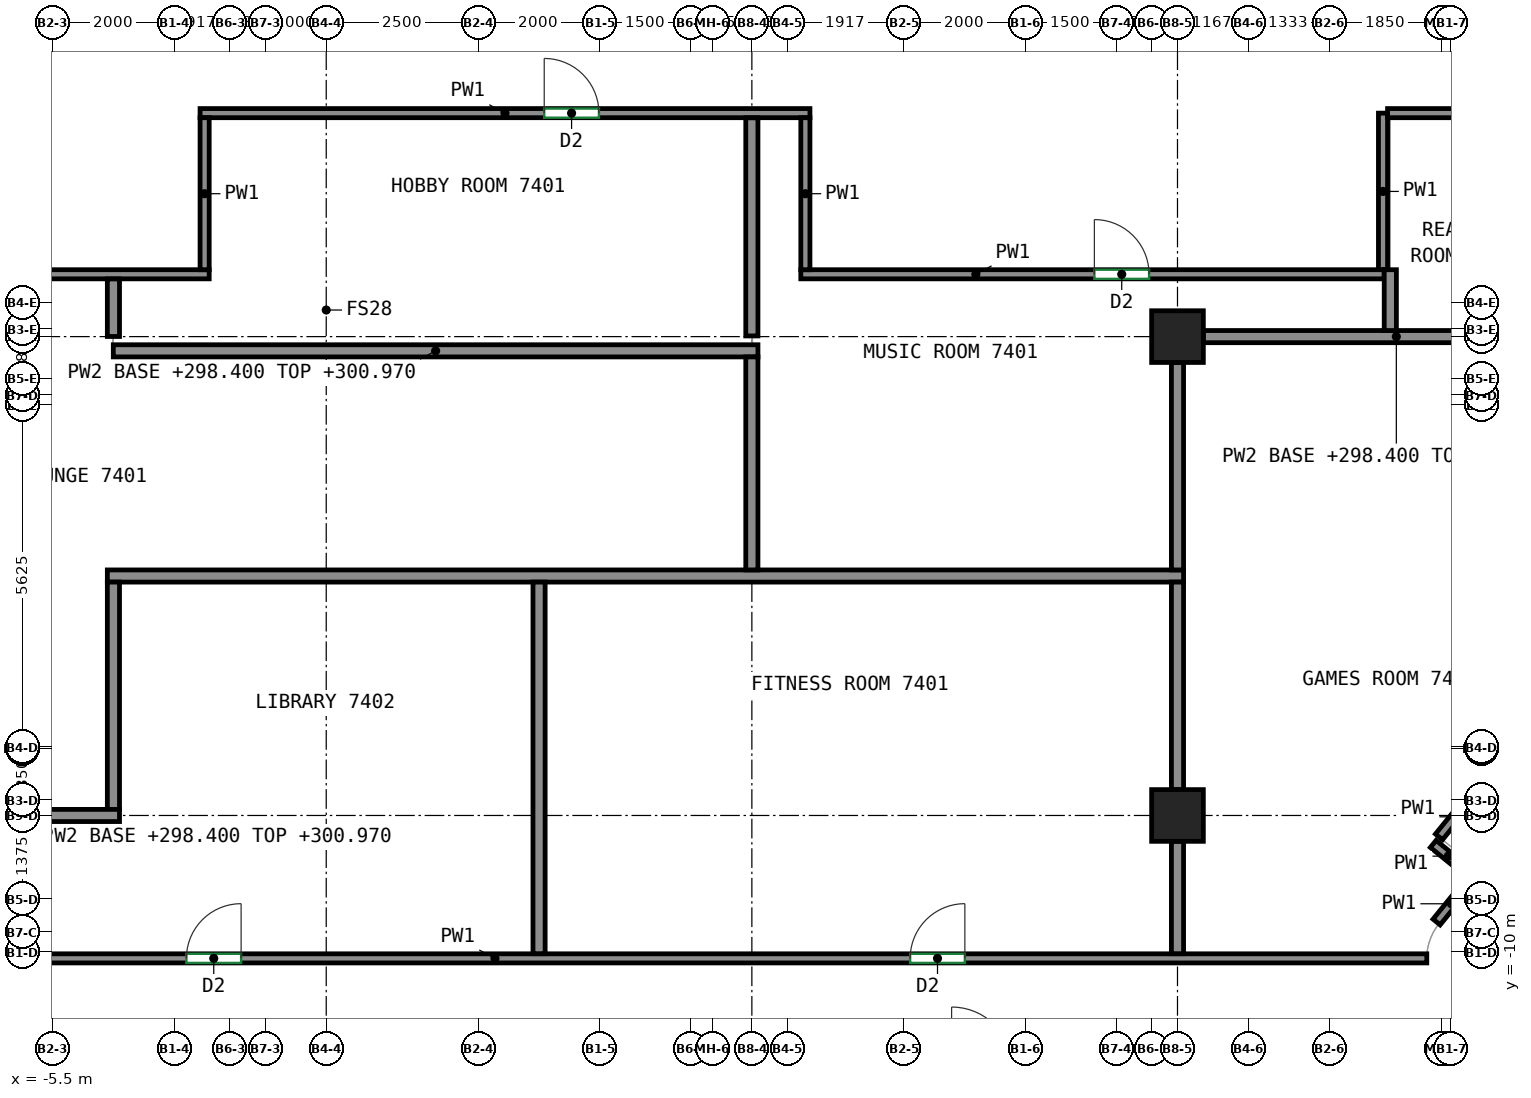
"""IFC4 building model, lengths in metres.
Left out: names, types, materials, properties, quantities, classifications, styles, units other than length and angle.
Written with IfcOpenShell. Run it as: python <this file> out.ifc"""

import sys

from ifc_helpers import new_model, si_unit, direction, frame, frame_2d, origin, origin_2d, place, context, subcontext, project, spatial, rectangle, extrude, source, transform, mapped, element, fill, save


model = new_model("IFC4")
c1 = context("Model", 3, precision=1e-05, world=origin(), true_north=direction((0.0, 1.0)))
c2 = subcontext(c1, "Body", "Model", "MODEL_VIEW")
j1 = project(units=[si_unit("LENGTHUNIT", "METRE"), si_unit("PLANEANGLEUNIT", "RADIAN")], contexts=[c1])
p1 = place(None, origin())
s1 = spatial("IfcSite", under=j1, at=p1, CompositionType="ELEMENT")
p2 = place(p1, origin())
s2 = spatial("IfcBuilding", under=s1, at=p2, CompositionType="ELEMENT")
p3 = place(p2, frame((0.0, 0.0, 298.4)))
s3 = spatial("IfcBuildingStorey", under=s2, at=p3, CompositionType="ELEMENT", Elevation=298.4)
m1 = source(origin(), c2, "Body", "SweptSolid", [
    extrude(rectangle(XDim=0.85, YDim=0.85, at=origin_2d()), origin(), (0.0, 0.0, 1.0), 3.12),
])
for number, where, z_axis, x_axis in (
    (1, (13.0, -7.75, 0.0), (0.0, 0.0, 1.0), (1.0, 0.0, 0.0)),
    (2, (13.0, 0.125, 0.0), (0.0, 0.0, 1.0), (1.0, 0.0, 0.0)),
):
    element("IfcColumn", number, at=place(p3, frame(where, z_axis=z_axis, x_axis=x_axis)), inside=s3, PredefinedType="COLUMN", context=c2, shape_type="MappedRepresentation", body=[
        mapped(m1, transform((0.0, 0.0, 0.0))),
    ])
p4 = place(p3, frame((-14.935, 1.15, 0.0), z_axis=(0.0, 0.0, 1.0), x_axis=(1.0, 0.0, 0.0)))
e3 = element("IfcWall", 3, at=p4, inside=s3, PredefinedType="PARTITIONING", context=c2, shape_type="SweptSolid", body=[
    extrude(rectangle(XDim=12.01, YDim=0.15, at=frame_2d((6.005, 0.0))), origin(), (0.0, 0.0, 1.0), 3.12),
])
p5 = place(p4, frame((3.418, 0.0, 0.0)))
e4 = element("IfcOpeningElement", 4, at=p5, cuts=e3, PredefinedType="OPENING", context=c2, shape_type="SweptSolid", body=[
    extrude(rectangle(XDim=1.8, YDim=2.1, at=frame_2d((0.9, 1.05))), frame((0.0, 0.085, 0.0), z_axis=(0.0, -1.0, 0.0), x_axis=(1.0, 0.0, 0.0)), (0.0, 0.0, 1.0), 0.17),
])
p6 = place(p3, frame((-13.55, -10.1, 0.0), z_axis=(0.0, 0.0, 1.0), x_axis=(1.0, 0.0, 0.0)))
e5 = element("IfcWall", 5, at=p6, inside=s3, PredefinedType="PARTITIONING", context=c2, shape_type="SweptSolid", body=[
    extrude(rectangle(XDim=30.65, YDim=0.15, at=frame_2d((15.325, 0.0))), origin(), (0.0, 0.0, 1.0), 3.12),
])
p7 = place(p6, frame((10.25, 0.0, 0.0)))
e6 = element("IfcOpeningElement", 6, at=p7, cuts=e5, PredefinedType="OPENING", context=c2, shape_type="SweptSolid", body=[
    extrude(rectangle(XDim=0.9, YDim=2.1, at=frame_2d((0.45, 1.05))), frame((0.0, 0.085, 0.0), z_axis=(0.0, -1.0, 0.0), x_axis=(1.0, 0.0, 0.0)), (0.0, 0.0, 1.0), 0.17),
])
p8 = place(p6, frame((22.153, 0.0, 0.0)))
e7 = element("IfcOpeningElement", 7, at=p8, cuts=e5, PredefinedType="OPENING", context=c2, shape_type="SweptSolid", body=[
    extrude(rectangle(XDim=0.9, YDim=2.1, at=frame_2d((0.45, 1.05))), frame((0.0, 0.085, 0.0), z_axis=(0.0, -1.0, 0.0), x_axis=(1.0, 0.0, 0.0)), (0.0, 0.0, 1.0), 0.17),
])
p9 = place(p3, frame((-3.075, 3.8, 0.0), z_axis=(0.0, 0.0, 1.0), x_axis=(1.0, 0.0, 0.0)))
e8 = element("IfcWall", 8, at=p9, inside=s3, PredefinedType="PARTITIONING", context=c2, shape_type="SweptSolid", body=[
    extrude(rectangle(XDim=10.03, YDim=0.15, at=frame_2d((5.015, 0.0))), origin(), (0.0, 0.0, 1.0), 3.12),
])
p10 = place(p9, frame((5.66, 0.0, 0.0)))
e9 = element("IfcOpeningElement", 9, at=p10, cuts=e8, PredefinedType="OPENING", context=c2, shape_type="SweptSolid", body=[
    extrude(rectangle(XDim=0.9, YDim=2.1, at=frame_2d((0.45, 1.05))), frame((0.0, 0.085, 0.0), z_axis=(0.0, -1.0, 0.0), x_axis=(1.0, 0.0, 0.0)), (0.0, 0.0, 1.0), 0.17),
])
p11 = place(p3, frame((-3.0, 1.225, 0.0), z_axis=(0.0, 0.0, 1.0), x_axis=(0.0, 1.0, 0.0)))
e10 = element("IfcWall", 10, at=p11, inside=s3, PredefinedType="PARTITIONING", context=c2, shape_type="SweptSolid", body=[
    extrude(rectangle(XDim=2.5, YDim=0.15, at=frame_2d((1.25, 0.0))), origin(), (0.0, 0.0, 1.0), 3.12),
])
p12 = place(p3, frame((16.38, 1.225, 0.0), z_axis=(0.0, 0.0, 1.0), x_axis=(0.0, 1.0, 0.0)))
e11 = element("IfcWall", 11, at=p12, inside=s3, PredefinedType="PARTITIONING", context=c2, shape_type="SweptSolid", body=[
    extrude(rectangle(XDim=2.575, YDim=0.15, at=frame_2d((1.288, 0.0))), origin(), (0.0, 0.0, 1.0), 3.12),
])
p13 = place(p3, frame((6.805, 1.15, 0.0), z_axis=(0.0, 0.0, 1.0), x_axis=(1.0, 0.0, 0.0)))
e12 = element("IfcWall", 12, at=p13, inside=s3, PredefinedType="PARTITIONING", context=c2, shape_type="SweptSolid", body=[
    extrude(rectangle(XDim=9.595, YDim=0.15, at=frame_2d((4.797, 0.0))), origin(), (0.0, 0.0, 1.0), 3.12),
])
p14 = place(p13, frame((4.828, 0.0, 0.0)))
e13 = element("IfcOpeningElement", 13, at=p14, cuts=e12, PredefinedType="OPENING", context=c2, shape_type="SweptSolid", body=[
    extrude(rectangle(XDim=0.9, YDim=2.1, at=frame_2d((0.45, 1.05))), frame((0.0, 0.085, 0.0), z_axis=(0.0, -1.0, 0.0), x_axis=(1.0, 0.0, 0.0)), (0.0, 0.0, 1.0), 0.17),
])
p15 = place(p3, frame((6.88, 3.725, 0.0), z_axis=(0.0, 0.0, 1.0), x_axis=(0.0, -1.0, 0.0)))
e14 = element("IfcWall", 14, at=p15, inside=s3, PredefinedType="PARTITIONING", context=c2, shape_type="SweptSolid", body=[
    extrude(rectangle(XDim=2.5, YDim=0.15, at=frame_2d((1.25, 0.0))), origin(), (0.0, 0.0, 1.0), 3.12),
])
p16 = place(p3, frame((17.748, -8.902, 0.0), z_axis=(0.0, 0.0, 1.0), x_axis=(-0.630342797145, -0.776316918589, 0.0)))
e15 = element("IfcWall", 15, at=p16, inside=s3, PredefinedType="PARTITIONING", context=c2, shape_type="SweptSolid", body=[
    extrude(rectangle(XDim=0.773, YDim=0.15, at=frame_2d((0.386, 0.0))), origin(), (0.0, 0.0, 1.0), 3.12),
])
p17 = place(p3, frame((17.206, -8.218, 0.0), z_axis=(0.0, 0.0, 1.0), x_axis=(0.776102288291, -0.630607039376, 0.0)))
e16 = element("IfcWall", 16, at=p17, inside=s3, PredefinedType="PARTITIONING", context=c2, shape_type="SweptSolid", body=[
    extrude(rectangle(XDim=0.638, YDim=0.15, at=frame_2d((0.319, 0.0))), origin(), (0.0, 0.0, 1.0), 3.12),
])
p18 = place(p3, frame((17.835, -7.442, 0.0), z_axis=(0.0, 0.0, 1.0), x_axis=(-0.628859024249, -0.777519342281, 0.0)))
e17 = element("IfcWall", 17, at=p18, inside=s3, PredefinedType="PARTITIONING", context=c2, shape_type="SweptSolid", body=[
    extrude(rectangle(XDim=0.849, YDim=0.15, at=frame_2d((0.425, 0.0))), origin(), (0.0, 0.0, 1.0), 3.12),
])
p19 = place(p3, frame((16.455, 3.8, 0.0), z_axis=(0.0, 0.0, 1.0), x_axis=(1.0, 0.0, 0.0)))
e18 = element("IfcWall", 18, at=p19, inside=s3, PredefinedType="PARTITIONING", context=c2, shape_type="SweptSolid", body=[
    extrude(rectangle(XDim=3.32, YDim=0.15, at=frame_2d((1.66, 0.0))), origin(), (0.0, 0.0, 1.0), 3.12),
])
p20 = place(p3, frame((-4.6, -3.812, 0.0), z_axis=(0.0, 0.0, 1.0), x_axis=(1.0, 0.0, 0.0)))
e19 = element("IfcWall", 19, at=p20, inside=s3, PredefinedType="PARTITIONING", context=c2, shape_type="SweptSolid", body=[
    extrude(rectangle(XDim=17.7, YDim=0.2, at=frame_2d((8.85, 0.0))), origin(), (0.0, 0.0, 1.0), 3.12),
])
p21 = place(p3, frame((-4.5, -7.65, 0.0), z_axis=(0.0, 0.0, 1.0), x_axis=(0.0, 1.0, 0.0)))
e20 = element("IfcWall", 20, at=p21, inside=s3, PredefinedType="PARTITIONING", context=c2, shape_type="SweptSolid", body=[
    extrude(rectangle(XDim=3.738, YDim=0.2, at=frame_2d((1.869, 0.0))), origin(), (0.0, 0.0, 1.0), 3.12),
])
p22 = place(p3, frame((-7.575, -7.75, 0.0), z_axis=(0.0, 0.0, 1.0), x_axis=(1.0, 0.0, 0.0)))
e21 = element("IfcWall", 21, at=p22, inside=s3, PredefinedType="PARTITIONING", context=c2, shape_type="SweptSolid", body=[
    extrude(rectangle(XDim=3.175, YDim=0.2, at=frame_2d((1.587, 0.0))), origin(), (0.0, 0.0, 1.0), 2.57),
])
p23 = place(p3, frame((-4.5, 0.127, 0.0), z_axis=(0.0, 0.0, 1.0), x_axis=(0.0, 1.0, 0.0)))
e22 = element("IfcWall", 22, at=p23, inside=s3, PredefinedType="PARTITIONING", context=c2, shape_type="SweptSolid", body=[
    extrude(rectangle(XDim=0.946, YDim=0.2, at=frame_2d((0.473, 0.0))), origin(), (0.0, 0.0, 1.0), 3.12),
])
p24 = place(p3, frame((6.1, -0.109, 0.0), z_axis=(0.0, 0.0, 1.0), x_axis=(-1.0, 0.0, 0.0)))
e23 = element("IfcWall", 23, at=p24, inside=s3, PredefinedType="PARTITIONING", context=c2, shape_type="SweptSolid", body=[
    extrude(rectangle(XDim=10.602, YDim=0.2, at=frame_2d((5.301, 0.0))), origin(), (0.0, 0.0, 1.0), 2.57),
])
p25 = place(p3, frame((6.0, -3.712, 0.0), z_axis=(0.0, 0.0, 1.0), x_axis=(0.0, 1.0, 0.0)))
e24 = element("IfcWall", 24, at=p25, inside=s3, PredefinedType="PARTITIONING", context=c2, shape_type="SweptSolid", body=[
    extrude(rectangle(XDim=3.503, YDim=0.2, at=frame_2d((1.751, 0.0))), origin(), (0.0, 0.0, 1.0), 3.12),
])
p26 = place(p3, frame((2.5, -10.023, 0.0), z_axis=(0.0, 0.0, 1.0), x_axis=(0.0, 1.0, 0.0)))
e25 = element("IfcWall", 25, at=p26, inside=s3, PredefinedType="PARTITIONING", context=c2, shape_type="SweptSolid", body=[
    extrude(rectangle(XDim=6.111, YDim=0.2, at=frame_2d((3.055, 0.0))), origin(), (0.0, 0.0, 1.0), 3.12),
])
p27 = place(p3, frame((6.0, 0.136, 0.0), z_axis=(0.0, 0.0, 1.0), x_axis=(0.0, 1.0, 0.0)))
e26 = element("IfcWall", 26, at=p27, inside=s3, PredefinedType="PARTITIONING", context=c2, shape_type="SweptSolid", body=[
    extrude(rectangle(XDim=3.587, YDim=0.2, at=frame_2d((1.793, 0.0))), origin(), (0.0, 0.0, 1.0), 3.12),
])
p28 = place(p3, frame((13.0, -7.325, 0.0), z_axis=(0.0, 0.0, 1.0), x_axis=(0.0, 1.0, 0.0)))
e27 = element("IfcWall", 27, at=p28, inside=s3, PredefinedType="PARTITIONING", context=c2, shape_type="SweptSolid", body=[
    extrude(rectangle(XDim=3.413, YDim=0.2, at=frame_2d((1.707, 0.0))), origin(), (0.0, 0.0, 1.0), 3.12),
])
p29 = place(p3, frame((13.0, -10.023, 0.0), z_axis=(0.0, 0.0, 1.0), x_axis=(0.0, 1.0, 0.0)))
e28 = element("IfcWall", 28, at=p29, inside=s3, PredefinedType="PARTITIONING", context=c2, shape_type="SweptSolid", body=[
    extrude(rectangle(XDim=1.848, YDim=0.2, at=frame_2d((0.924, 0.0))), origin(), (0.0, 0.0, 1.0), 3.12),
])
p30 = place(p3, frame((13.425, 0.125, 0.0), z_axis=(0.0, 0.0, 1.0), x_axis=(1.0, 0.0, 0.0)))
e29 = element("IfcWall", 29, at=p30, inside=s3, PredefinedType="PARTITIONING", context=c2, shape_type="SweptSolid", body=[
    extrude(rectangle(XDim=6.348, YDim=0.2, at=frame_2d((3.174, 0.0))), origin(), (0.0, 0.0, 1.0), 2.57),
])
p31 = place(p3, frame((13.0, -3.712, 0.0), z_axis=(0.0, 0.0, 1.0), x_axis=(0.0, 1.0, 0.0)))
e30 = element("IfcWall", 30, at=p31, inside=s3, PredefinedType="PARTITIONING", context=c2, shape_type="SweptSolid", body=[
    extrude(rectangle(XDim=3.412, YDim=0.2, at=frame_2d((1.706, 0.0))), origin(), (0.0, 0.0, 1.0), 3.12),
])
p32 = place(p3, frame((16.5, 0.225, 0.0), z_axis=(0.0, 0.0, 1.0), x_axis=(0.0, 1.0, 0.0)))
e31 = element("IfcWall", 31, at=p32, inside=s3, PredefinedType="PARTITIONING", context=c2, shape_type="SweptSolid", body=[
    extrude(rectangle(XDim=1.0, YDim=0.2, at=frame_2d((0.5, 0.0))), origin(), (0.0, 0.0, 1.0), 3.12),
])
p33 = place(p7, origin())
e32 = element("IfcDoor", 32, at=p33, inside=s3, OperationType="SINGLE_SWING_RIGHT", PredefinedType="DOOR", context=c2, shape_type="SweptSolid", body=[
    extrude(rectangle(XDim=0.9, YDim=2.1, at=frame_2d((0.45, 1.05))), frame((0.0, 0.025, 0.0), z_axis=(0.0, -1.0, 0.0), x_axis=(1.0, 0.0, 0.0)), (0.0, 0.0, 1.0), 0.05),
])
fill(e6, e32)
p34 = place(p8, origin())
e33 = element("IfcDoor", 33, at=p34, inside=s3, OperationType="SINGLE_SWING_RIGHT", PredefinedType="DOOR", context=c2, shape_type="SweptSolid", body=[
    extrude(rectangle(XDim=0.9, YDim=2.1, at=frame_2d((0.45, 1.05))), frame((0.0, 0.025, 0.0), z_axis=(0.0, -1.0, 0.0), x_axis=(1.0, 0.0, 0.0)), (0.0, 0.0, 1.0), 0.05),
])
fill(e7, e33)
p35 = place(p14, origin())
e34 = element("IfcDoor", 34, at=p35, inside=s3, OperationType="SINGLE_SWING_LEFT", PredefinedType="DOOR", context=c2, shape_type="SweptSolid", body=[
    extrude(rectangle(XDim=0.9, YDim=2.1, at=frame_2d((0.45, 1.05))), frame((0.0, 0.025, 0.0), z_axis=(0.0, -1.0, 0.0), x_axis=(1.0, 0.0, 0.0)), (0.0, 0.0, 1.0), 0.05),
])
fill(e13, e34)
p36 = place(p10, origin())
e35 = element("IfcDoor", 35, at=p36, inside=s3, OperationType="SINGLE_SWING_LEFT", PredefinedType="DOOR", context=c2, shape_type="SweptSolid", body=[
    extrude(rectangle(XDim=0.9, YDim=2.1, at=frame_2d((0.45, 1.05))), frame((0.0, 0.025, 0.0), z_axis=(0.0, -1.0, 0.0), x_axis=(1.0, 0.0, 0.0)), (0.0, 0.0, 1.0), 0.05),
])
fill(e9, e35)
save(model, sys.argv[1])
